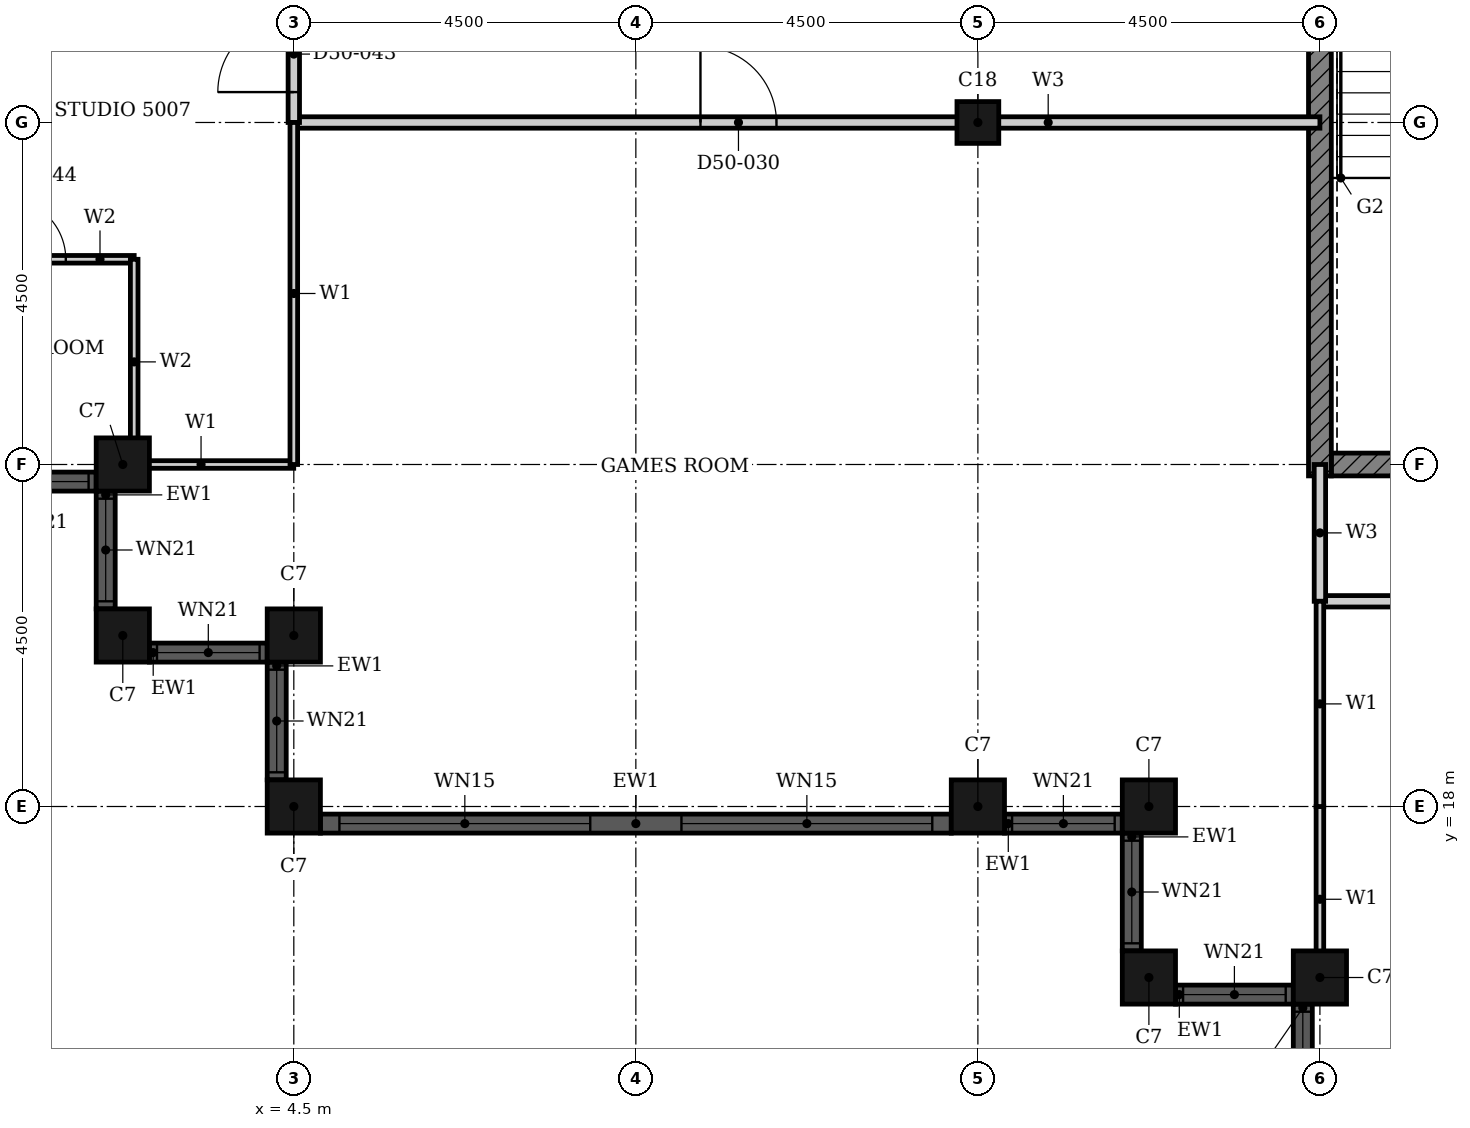
"""IFC4 building model, lengths in metres.
Left out: names, types, materials, properties, quantities, classifications, styles, units other than length and angle.
Written with IfcOpenShell. Run it as: python <this file> out.ifc"""

import sys

from ifc_helpers import new_model, si_unit, direction, frame, frame_2d, origin, origin_2d, place, context, subcontext, project, spatial, rectangle, hollow_rectangle, extrude, element, fill, save


model = new_model("IFC4")
c1 = context("Model", 3, precision=1e-05, world=origin(), true_north=direction((0.0, 1.0)))
c2 = subcontext(c1, "Body", "Model", "MODEL_VIEW")
j1 = project(units=[si_unit("LENGTHUNIT", "METRE"), si_unit("PLANEANGLEUNIT", "RADIAN")], contexts=[c1])
p1 = place(None, origin())
s1 = spatial("IfcSite", under=j1, at=p1, CompositionType="ELEMENT")
p2 = place(p1, origin())
s2 = spatial("IfcBuilding", under=s1, at=p2, CompositionType="ELEMENT")
p3 = place(p2, frame((0.0, 0.0, 199.8)))
s3 = spatial("IfcBuildingStorey", under=s2, at=p3, CompositionType="ELEMENT", Elevation=199.8)
for number, where, z_axis, x_axis in (
    (1, (2.25, 22.5, 0.0), (0.0, 0.0, 1.0), (1.0, 0.0, 0.0)),
    (2, (2.25, 20.25, 0.0), (0.0, 0.0, 1.0), (1.0, 0.0, 0.0)),
    (3, (4.5, 20.25, 0.0), (0.0, 0.0, 1.0), (1.0, 0.0, 0.0)),
    (4, (4.5, 18.0, 0.0), (0.0, 0.0, 1.0), (1.0, 0.0, 0.0)),
    (5, (13.5, 18.0, 0.0), (0.0, 0.0, 1.0), (1.0, 0.0, 0.0)),
    (6, (15.75, 18.0, 0.0), (0.0, 0.0, 1.0), (1.0, 0.0, 0.0)),
    (7, (15.75, 15.75, 0.0), (0.0, 0.0, 1.0), (1.0, 0.0, 0.0)),
    (8, (18.0, 15.75, 0.0), (0.0, 0.0, 1.0), (1.0, 0.0, 0.0)),
):
    element("IfcColumn", number, at=place(p3, frame(where, z_axis=z_axis, x_axis=x_axis)), inside=s3, PredefinedType="COLUMN", context=c2, shape_type="SweptSolid", body=[
        extrude(hollow_rectangle(XDim=0.7, YDim=0.7, WallThickness=0.022, at=origin_2d()), origin(), (0.0, 0.0, 1.0), 3.7),
    ])
p4 = place(p3, frame((13.5, 27.0, 0.0), z_axis=(0.0, 0.0, 1.0), x_axis=(1.0, 0.0, 0.0)))
e9 = element("IfcColumn", 9, at=p4, inside=s3, PredefinedType="COLUMN", context=c2, shape_type="SweptSolid", body=[
    extrude(hollow_rectangle(XDim=0.55, YDim=0.55, WallThickness=0.018, at=origin_2d()), origin(), (0.0, 0.0, 1.0), 3.7),
])
p5 = place(p3, frame((0.35, 22.275, 0.0), z_axis=(0.0, 0.0, 1.0), x_axis=(1.0, 0.0, 0.0)))
e10 = element("IfcWall", 10, at=p5, inside=s3, PredefinedType="SOLIDWALL", context=c2, shape_type="SweptSolid", body=[
    extrude(rectangle(XDim=1.55, YDim=0.25, at=frame_2d((0.775, 0.0))), origin(), (0.0, 0.0, 1.0), 3.7),
])
p6 = place(p5, frame((0.1, 0.0, 0.9)))
e11 = element("IfcOpeningElement", 11, at=p6, cuts=e10, PredefinedType="OPENING", context=c2, shape_type="SweptSolid", body=[
    extrude(rectangle(XDim=1.35, YDim=1.85, at=frame_2d((0.675, 0.925))), frame((0.0, 0.135, 0.0), z_axis=(0.0, -1.0, 0.0), x_axis=(1.0, 0.0, 0.0)), (0.0, 0.0, 1.0), 0.27),
])
p7 = place(p3, frame((2.025, 22.15, 0.0), z_axis=(0.0, 0.0, 1.0), x_axis=(0.0, -1.0, 0.0)))
e12 = element("IfcWall", 12, at=p7, inside=s3, PredefinedType="SOLIDWALL", context=c2, shape_type="SweptSolid", body=[
    extrude(rectangle(XDim=1.55, YDim=0.25, at=frame_2d((0.775, 0.0))), origin(), (0.0, 0.0, 1.0), 3.7),
])
p8 = place(p7, frame((0.1, 0.0, 0.9)))
e13 = element("IfcOpeningElement", 13, at=p8, cuts=e12, PredefinedType="OPENING", context=c2, shape_type="SweptSolid", body=[
    extrude(rectangle(XDim=1.35, YDim=1.85, at=frame_2d((0.675, 0.925))), frame((0.0, 0.135, 0.0), z_axis=(0.0, -1.0, 0.0), x_axis=(1.0, 0.0, 0.0)), (0.0, 0.0, 1.0), 0.27),
])
p9 = place(p3, frame((2.6, 20.025, 0.0), z_axis=(0.0, 0.0, 1.0), x_axis=(1.0, 0.0, 0.0)))
e14 = element("IfcWall", 14, at=p9, inside=s3, PredefinedType="SOLIDWALL", context=c2, shape_type="SweptSolid", body=[
    extrude(rectangle(XDim=1.55, YDim=0.25, at=frame_2d((0.775, 0.0))), origin(), (0.0, 0.0, 1.0), 3.7),
])
p10 = place(p9, frame((0.1, 0.0, 0.9)))
e15 = element("IfcOpeningElement", 15, at=p10, cuts=e14, PredefinedType="OPENING", context=c2, shape_type="SweptSolid", body=[
    extrude(rectangle(XDim=1.35, YDim=1.85, at=frame_2d((0.675, 0.925))), frame((0.0, 0.135, 0.0), z_axis=(0.0, -1.0, 0.0), x_axis=(1.0, 0.0, 0.0)), (0.0, 0.0, 1.0), 0.27),
])
p11 = place(p3, frame((4.275, 19.9, 0.0), z_axis=(0.0, 0.0, 1.0), x_axis=(0.0, -1.0, 0.0)))
e16 = element("IfcWall", 16, at=p11, inside=s3, PredefinedType="SOLIDWALL", context=c2, shape_type="SweptSolid", body=[
    extrude(rectangle(XDim=1.55, YDim=0.25, at=frame_2d((0.775, 0.0))), origin(), (0.0, 0.0, 1.0), 3.7),
])
p12 = place(p11, frame((0.1, 0.0, 0.9)))
e17 = element("IfcOpeningElement", 17, at=p12, cuts=e16, PredefinedType="OPENING", context=c2, shape_type="SweptSolid", body=[
    extrude(rectangle(XDim=1.35, YDim=1.85, at=frame_2d((0.675, 0.925))), frame((0.0, 0.135, 0.0), z_axis=(0.0, -1.0, 0.0), x_axis=(1.0, 0.0, 0.0)), (0.0, 0.0, 1.0), 0.27),
])
p13 = place(p3, frame((4.85, 17.775, 0.0), z_axis=(0.0, 0.0, 1.0), x_axis=(1.0, 0.0, 0.0)))
e18 = element("IfcWall", 18, at=p13, inside=s3, PredefinedType="SOLIDWALL", context=c2, shape_type="SweptSolid", body=[
    extrude(rectangle(XDim=8.3, YDim=0.25, at=frame_2d((4.15, 0.0))), origin(), (0.0, 0.0, 1.0), 3.7),
])
p14 = place(p13, frame((0.25, 0.0, 0.45)))
e19 = element("IfcOpeningElement", 19, at=p14, cuts=e18, PredefinedType="OPENING", context=c2, shape_type="SweptSolid", body=[
    extrude(rectangle(XDim=3.3, YDim=2.3, at=frame_2d((1.65, 1.15))), frame((0.0, 0.135, 0.0), z_axis=(0.0, -1.0, 0.0), x_axis=(1.0, 0.0, 0.0)), (0.0, 0.0, 1.0), 0.27),
])
p15 = place(p13, frame((4.75, 0.0, 0.45)))
e20 = element("IfcOpeningElement", 20, at=p15, cuts=e18, PredefinedType="OPENING", context=c2, shape_type="SweptSolid", body=[
    extrude(rectangle(XDim=3.3, YDim=2.3, at=frame_2d((1.65, 1.15))), frame((0.0, 0.135, 0.0), z_axis=(0.0, -1.0, 0.0), x_axis=(1.0, 0.0, 0.0)), (0.0, 0.0, 1.0), 0.27),
])
p16 = place(p3, frame((13.85, 17.775, 0.0), z_axis=(0.0, 0.0, 1.0), x_axis=(1.0, 0.0, 0.0)))
e21 = element("IfcWall", 21, at=p16, inside=s3, PredefinedType="SOLIDWALL", context=c2, shape_type="SweptSolid", body=[
    extrude(rectangle(XDim=1.55, YDim=0.25, at=frame_2d((0.775, 0.0))), origin(), (0.0, 0.0, 1.0), 3.7),
])
p17 = place(p16, frame((0.1, 0.0, 0.9)))
e22 = element("IfcOpeningElement", 22, at=p17, cuts=e21, PredefinedType="OPENING", context=c2, shape_type="SweptSolid", body=[
    extrude(rectangle(XDim=1.35, YDim=1.85, at=frame_2d((0.675, 0.925))), frame((0.0, 0.135, 0.0), z_axis=(0.0, -1.0, 0.0), x_axis=(1.0, 0.0, 0.0)), (0.0, 0.0, 1.0), 0.27),
])
p18 = place(p3, frame((15.525, 17.65, 0.0), z_axis=(0.0, 0.0, 1.0), x_axis=(0.0, -1.0, 0.0)))
e23 = element("IfcWall", 23, at=p18, inside=s3, PredefinedType="SOLIDWALL", context=c2, shape_type="SweptSolid", body=[
    extrude(rectangle(XDim=1.55, YDim=0.25, at=frame_2d((0.775, 0.0))), origin(), (0.0, 0.0, 1.0), 3.7),
])
p19 = place(p18, frame((0.1, 0.0, 0.9)))
e24 = element("IfcOpeningElement", 24, at=p19, cuts=e23, PredefinedType="OPENING", context=c2, shape_type="SweptSolid", body=[
    extrude(rectangle(XDim=1.35, YDim=1.85, at=frame_2d((0.675, 0.925))), frame((0.0, 0.135, 0.0), z_axis=(0.0, -1.0, 0.0), x_axis=(1.0, 0.0, 0.0)), (0.0, 0.0, 1.0), 0.27),
])
p20 = place(p3, frame((16.1, 15.525, 0.0), z_axis=(0.0, 0.0, 1.0), x_axis=(1.0, 0.0, 0.0)))
e25 = element("IfcWall", 25, at=p20, inside=s3, PredefinedType="SOLIDWALL", context=c2, shape_type="SweptSolid", body=[
    extrude(rectangle(XDim=1.55, YDim=0.25, at=frame_2d((0.775, 0.0))), origin(), (0.0, 0.0, 1.0), 3.7),
])
p21 = place(p20, frame((0.1, 0.0, 0.9)))
e26 = element("IfcOpeningElement", 26, at=p21, cuts=e25, PredefinedType="OPENING", context=c2, shape_type="SweptSolid", body=[
    extrude(rectangle(XDim=1.35, YDim=1.85, at=frame_2d((0.675, 0.925))), frame((0.0, 0.135, 0.0), z_axis=(0.0, -1.0, 0.0), x_axis=(1.0, 0.0, 0.0)), (0.0, 0.0, 1.0), 0.27),
])
p22 = place(p3, frame((17.775, 15.4, 0.0), z_axis=(0.0, 0.0, 1.0), x_axis=(0.0, -1.0, 0.0)))
e27 = element("IfcWall", 27, at=p22, inside=s3, PredefinedType="SOLIDWALL", context=c2, shape_type="SweptSolid", body=[
    extrude(rectangle(XDim=1.55, YDim=0.25, at=frame_2d((0.775, 0.0))), origin(), (0.0, 0.0, 1.0), 3.7),
])
p23 = place(p22, frame((0.1, 0.0, 0.9)))
e28 = element("IfcOpeningElement", 28, at=p23, cuts=e27, PredefinedType="OPENING", context=c2, shape_type="SweptSolid", body=[
    extrude(rectangle(XDim=1.35, YDim=1.85, at=frame_2d((0.675, 0.925))), frame((0.0, 0.135, 0.0), z_axis=(0.0, -1.0, 0.0), x_axis=(1.0, 0.0, 0.0)), (0.0, 0.0, 1.0), 0.27),
])
p24 = place(p3, frame((18.15, 22.5, 0.0), z_axis=(0.0, 0.0, 1.0), x_axis=(1.0, 0.0, 0.0)))
e29 = element("IfcWall", 29, at=p24, inside=s3, PredefinedType="SHEAR", context=c2, shape_type="SweptSolid", body=[
    extrude(rectangle(XDim=4.225, YDim=0.3, at=frame_2d((2.113, 0.0))), origin(), (0.0, 0.0, 1.0), 3.4),
])
p25 = place(p3, frame((18.0, 22.35, 0.0), z_axis=(0.0, 0.0, 1.0), x_axis=(0.0, 1.0, 0.0)))
e30 = element("IfcWall", 30, at=p25, inside=s3, PredefinedType="SHEAR", context=c2, shape_type="SweptSolid", body=[
    extrude(rectangle(XDim=9.3, YDim=0.3, at=frame_2d((4.65, 0.0))), origin(), (0.0, 0.0, 1.0), 3.4),
])
p26 = place(p3, frame((18.0, 20.7, 0.0), z_axis=(0.0, 0.0, 1.0), x_axis=(1.0, 0.0, 0.0)))
e31 = element("IfcWall", 31, at=p26, inside=s3, PredefinedType="PARTITIONING", context=c2, shape_type="SweptSolid", body=[
    extrude(rectangle(XDim=13.5, YDim=0.15, at=frame_2d((6.75, 0.0))), origin(), (0.0, 0.0, 1.0), 3.4),
])
p27 = place(p26, frame((6.25, 0.0, 0.0)))
e32 = element("IfcOpeningElement", 32, at=p27, cuts=e31, PredefinedType="OPENING", context=c2, shape_type="SweptSolid", body=[
    extrude(rectangle(XDim=1.0, YDim=2.1, at=frame_2d((0.5, 1.05))), frame((0.0, 0.085, 0.0), z_axis=(0.0, -1.0, 0.0), x_axis=(1.0, 0.0, 0.0)), (0.0, 0.0, 1.0), 0.17),
])
p28 = place(p3, frame((4.5, 27.0, 0.0), z_axis=(0.0, 0.0, 1.0), x_axis=(1.0, 0.0, 0.0)))
e33 = element("IfcWall", 33, at=p28, inside=s3, PredefinedType="PARTITIONING", context=c2, shape_type="SweptSolid", body=[
    extrude(rectangle(XDim=13.5, YDim=0.15, at=frame_2d((6.75, 0.0))), origin(), (0.0, 0.0, 1.0), 2.68),
])
p29 = place(p28, frame((5.35, 0.0, 0.0)))
e34 = element("IfcOpeningElement", 34, at=p29, cuts=e33, PredefinedType="OPENING", context=c2, shape_type="SweptSolid", body=[
    extrude(rectangle(XDim=1.0, YDim=2.1, at=frame_2d((0.5, 1.05))), frame((0.0, 0.085, 0.0), z_axis=(0.0, -1.0, 0.0), x_axis=(1.0, 0.0, 0.0)), (0.0, 0.0, 1.0), 0.17),
])
p30 = place(p3, frame((18.0, 20.7, 0.0), z_axis=(0.0, 0.0, 1.0), x_axis=(0.0, 1.0, 0.0)))
e35 = element("IfcWall", 35, at=p30, inside=s3, PredefinedType="PARTITIONING", context=c2, shape_type="SweptSolid", body=[
    extrude(rectangle(XDim=1.8, YDim=0.15, at=frame_2d((0.9, 0.0))), origin(), (0.0, 0.0, 1.0), 3.4),
])
p31 = place(p3, frame((4.5, 27.0, 0.0), z_axis=(0.0, 0.0, 1.0), x_axis=(0.0, 1.0, 0.0)))
e36 = element("IfcWall", 36, at=p31, inside=s3, PredefinedType="PARTITIONING", context=c2, shape_type="SweptSolid", body=[
    extrude(rectangle(XDim=1.8, YDim=0.15, at=frame_2d((0.9, 0.0))), origin(), (0.0, 0.0, 1.0), 3.4),
])
p32 = place(p31, frame((0.4, 0.0, 0.0)))
e37 = element("IfcOpeningElement", 37, at=p32, cuts=e36, PredefinedType="OPENING", context=c2, shape_type="SweptSolid", body=[
    extrude(rectangle(XDim=1.0, YDim=2.2, at=frame_2d((0.5, 1.1))), frame((0.0, 0.085, 0.0), z_axis=(0.0, -1.0, 0.0), x_axis=(1.0, 0.0, 0.0)), (0.0, 0.0, 1.0), 0.17),
])
p33 = place(p3, frame((2.06, 22.5, 0.0), z_axis=(0.0, 0.0, 1.0), x_axis=(1.0, 0.0, 0.0)))
e38 = element("IfcWall", 38, at=p33, inside=s3, PredefinedType="PARTITIONING", context=c2, shape_type="SweptSolid", body=[
    extrude(rectangle(XDim=2.439, YDim=0.1, at=frame_2d((1.219, 0.0))), origin(), (0.0, 0.0, 1.0), 2.68),
])
p34 = place(p3, frame((18.0, 15.56, 0.0), z_axis=(0.0, 0.0, 1.0), x_axis=(0.0, 1.0, 0.0)))
e39 = element("IfcWall", 39, at=p34, inside=s3, PredefinedType="PARTITIONING", context=c2, shape_type="SweptSolid", body=[
    extrude(rectangle(XDim=2.439, YDim=0.1, at=frame_2d((1.219, 0.0))), origin(), (0.0, 0.0, 1.0), 3.4),
])
p35 = place(p3, frame((18.0, 18.0, 0.0), z_axis=(0.0, 0.0, 1.0), x_axis=(0.0, 1.0, 0.0)))
e40 = element("IfcWall", 40, at=p35, inside=s3, PredefinedType="PARTITIONING", context=c2, shape_type="SweptSolid", body=[
    extrude(rectangle(XDim=2.7, YDim=0.1, at=frame_2d((1.35, 0.0))), origin(), (0.0, 0.0, 1.0), 3.4),
])
p36 = place(p3, frame((4.5, 22.5, 0.0), z_axis=(0.0, 0.0, 1.0), x_axis=(0.0, 1.0, 0.0)))
e41 = element("IfcWall", 41, at=p36, inside=s3, PredefinedType="PARTITIONING", context=c2, shape_type="SweptSolid", body=[
    extrude(rectangle(XDim=4.5, YDim=0.1, at=frame_2d((2.25, 0.0))), origin(), (0.0, 0.0, 1.0), 3.4),
])
p37 = place(p3, frame((-0.1, 25.2, 0.0), z_axis=(0.0, 0.0, 1.0), x_axis=(1.0, 0.0, 0.0)))
e42 = element("IfcWall", 42, at=p37, inside=s3, PredefinedType="PARTITIONING", context=c2, shape_type="SweptSolid", body=[
    extrude(rectangle(XDim=2.5, YDim=0.1, at=frame_2d((1.25, 0.0))), origin(), (0.0, 0.0, 1.0), 3.4),
])
p38 = place(p37, frame((0.8, 0.0, 0.0)))
e43 = element("IfcOpeningElement", 43, at=p38, cuts=e42, PredefinedType="OPENING", context=c2, shape_type="SweptSolid", body=[
    extrude(rectangle(XDim=0.8, YDim=2.1, at=frame_2d((0.4, 1.05))), frame((0.0, 0.06, 0.0), z_axis=(0.0, -1.0, 0.0), x_axis=(1.0, 0.0, 0.0)), (0.0, 0.0, 1.0), 0.12),
])
p39 = place(p3, frame((2.4, 22.5, 0.0), z_axis=(0.0, 0.0, 1.0), x_axis=(0.0, 1.0, 0.0)))
e44 = element("IfcWall", 44, at=p39, inside=s3, PredefinedType="PARTITIONING", context=c2, shape_type="SweptSolid", body=[
    extrude(rectangle(XDim=2.7, YDim=0.1, at=frame_2d((1.35, 0.0))), origin(), (0.0, 0.0, 1.0), 3.4),
])
p40 = place(p6, origin())
e45 = element("IfcWindow", 45, at=p40, inside=s3, PartitioningType="SINGLE_PANEL", PredefinedType="WINDOW", context=c2, shape_type="SweptSolid", body=[
    extrude(rectangle(XDim=1.35, YDim=1.85, at=frame_2d((0.675, 0.925))), frame((0.0, 0.03, 0.0), z_axis=(0.0, -1.0, 0.0), x_axis=(1.0, 0.0, 0.0)), (0.0, 0.0, 1.0), 0.06),
])
fill(e11, e45)
p41 = place(p8, origin())
e46 = element("IfcWindow", 46, at=p41, inside=s3, PartitioningType="SINGLE_PANEL", PredefinedType="WINDOW", context=c2, shape_type="SweptSolid", body=[
    extrude(rectangle(XDim=1.35, YDim=1.85, at=frame_2d((0.675, 0.925))), frame((0.0, 0.03, 0.0), z_axis=(0.0, -1.0, 0.0), x_axis=(1.0, 0.0, 0.0)), (0.0, 0.0, 1.0), 0.06),
])
fill(e13, e46)
p42 = place(p10, origin())
e47 = element("IfcWindow", 47, at=p42, inside=s3, PartitioningType="SINGLE_PANEL", PredefinedType="WINDOW", context=c2, shape_type="SweptSolid", body=[
    extrude(rectangle(XDim=1.35, YDim=1.85, at=frame_2d((0.675, 0.925))), frame((0.0, 0.03, 0.0), z_axis=(0.0, -1.0, 0.0), x_axis=(1.0, 0.0, 0.0)), (0.0, 0.0, 1.0), 0.06),
])
fill(e15, e47)
p43 = place(p12, origin())
e48 = element("IfcWindow", 48, at=p43, inside=s3, PartitioningType="SINGLE_PANEL", PredefinedType="WINDOW", context=c2, shape_type="SweptSolid", body=[
    extrude(rectangle(XDim=1.35, YDim=1.85, at=frame_2d((0.675, 0.925))), frame((0.0, 0.03, 0.0), z_axis=(0.0, -1.0, 0.0), x_axis=(1.0, 0.0, 0.0)), (0.0, 0.0, 1.0), 0.06),
])
fill(e17, e48)
p44 = place(p14, origin())
e49 = element("IfcWindow", 49, at=p44, inside=s3, PartitioningType="SINGLE_PANEL", PredefinedType="WINDOW", context=c2, shape_type="SweptSolid", body=[
    extrude(rectangle(XDim=3.3, YDim=2.3, at=frame_2d((1.65, 1.15))), frame((0.0, 0.03, 0.0), z_axis=(0.0, -1.0, 0.0), x_axis=(1.0, 0.0, 0.0)), (0.0, 0.0, 1.0), 0.06),
])
fill(e19, e49)
p45 = place(p15, origin())
e50 = element("IfcWindow", 50, at=p45, inside=s3, PartitioningType="SINGLE_PANEL", PredefinedType="WINDOW", context=c2, shape_type="SweptSolid", body=[
    extrude(rectangle(XDim=3.3, YDim=2.3, at=frame_2d((1.65, 1.15))), frame((0.0, 0.03, 0.0), z_axis=(0.0, -1.0, 0.0), x_axis=(1.0, 0.0, 0.0)), (0.0, 0.0, 1.0), 0.06),
])
fill(e20, e50)
p46 = place(p17, origin())
e51 = element("IfcWindow", 51, at=p46, inside=s3, PartitioningType="SINGLE_PANEL", PredefinedType="WINDOW", context=c2, shape_type="SweptSolid", body=[
    extrude(rectangle(XDim=1.35, YDim=1.85, at=frame_2d((0.675, 0.925))), frame((0.0, 0.03, 0.0), z_axis=(0.0, -1.0, 0.0), x_axis=(1.0, 0.0, 0.0)), (0.0, 0.0, 1.0), 0.06),
])
fill(e22, e51)
p47 = place(p19, origin())
e52 = element("IfcWindow", 52, at=p47, inside=s3, PartitioningType="SINGLE_PANEL", PredefinedType="WINDOW", context=c2, shape_type="SweptSolid", body=[
    extrude(rectangle(XDim=1.35, YDim=1.85, at=frame_2d((0.675, 0.925))), frame((0.0, 0.03, 0.0), z_axis=(0.0, -1.0, 0.0), x_axis=(1.0, 0.0, 0.0)), (0.0, 0.0, 1.0), 0.06),
])
fill(e24, e52)
p48 = place(p21, origin())
e53 = element("IfcWindow", 53, at=p48, inside=s3, PartitioningType="SINGLE_PANEL", PredefinedType="WINDOW", context=c2, shape_type="SweptSolid", body=[
    extrude(rectangle(XDim=1.35, YDim=1.85, at=frame_2d((0.675, 0.925))), frame((0.0, 0.03, 0.0), z_axis=(0.0, -1.0, 0.0), x_axis=(1.0, 0.0, 0.0)), (0.0, 0.0, 1.0), 0.06),
])
fill(e26, e53)
p49 = place(p23, origin())
e54 = element("IfcWindow", 54, at=p49, inside=s3, PartitioningType="SINGLE_PANEL", PredefinedType="WINDOW", context=c2, shape_type="SweptSolid", body=[
    extrude(rectangle(XDim=1.35, YDim=1.85, at=frame_2d((0.675, 0.925))), frame((0.0, 0.03, 0.0), z_axis=(0.0, -1.0, 0.0), x_axis=(1.0, 0.0, 0.0)), (0.0, 0.0, 1.0), 0.06),
])
fill(e28, e54)
p50 = place(p29, origin())
e55 = element("IfcDoor", 55, at=p50, inside=s3, OperationType="SINGLE_SWING_LEFT", PredefinedType="DOOR", context=c2, shape_type="SweptSolid", body=[
    extrude(rectangle(XDim=1.0, YDim=2.1, at=frame_2d((0.5, 1.05))), frame((0.0, 0.025, 0.0), z_axis=(0.0, -1.0, 0.0), x_axis=(1.0, 0.0, 0.0)), (0.0, 0.0, 1.0), 0.05),
])
fill(e34, e55)
p51 = place(p32, origin())
e56 = element("IfcDoor", 56, at=p51, inside=s3, OperationType="SINGLE_SWING_LEFT", PredefinedType="DOOR", context=c2, shape_type="SweptSolid", body=[
    extrude(rectangle(XDim=1.0, YDim=2.2, at=frame_2d((0.5, 1.1))), frame((0.0, 0.025, 0.0), z_axis=(0.0, -1.0, 0.0), x_axis=(1.0, 0.0, 0.0)), (0.0, 0.0, 1.0), 0.05),
])
fill(e37, e56)
p52 = place(p38, origin())
e57 = element("IfcDoor", 57, at=p52, inside=s3, OperationType="SINGLE_SWING_LEFT", PredefinedType="DOOR", context=c2, shape_type="SweptSolid", body=[
    extrude(rectangle(XDim=0.8, YDim=2.1, at=frame_2d((0.4, 1.05))), frame((0.0, 0.025, 0.0), z_axis=(0.0, -1.0, 0.0), x_axis=(1.0, 0.0, 0.0)), (0.0, 0.0, 1.0), 0.05),
])
fill(e43, e57)
save(model, sys.argv[1])
